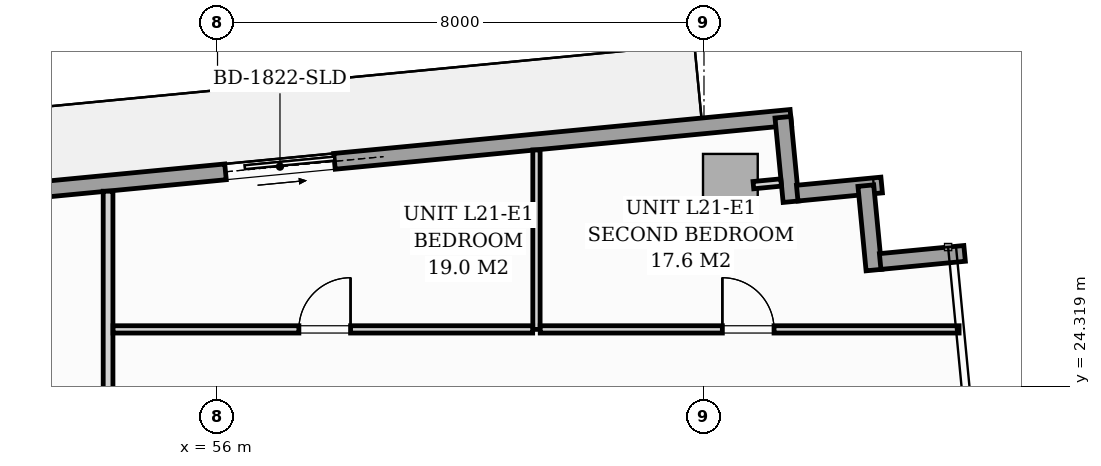
"""IFC4 building model, lengths in metres.
Left out: names, types, materials, properties, quantities, classifications, styles, units other than length and angle.
Written with IfcOpenShell. Run it as: python <this file> out.ifc"""

import sys

from ifc_helpers import new_model, si_unit, direction, frame, frame_2d, origin, origin_2d, place, context, subcontext, project, spatial, rectangle, extrude, source, transform, mapped, element, fill, save


model = new_model("IFC4")
c1 = context("Model", 3, precision=1e-05, world=origin(), true_north=direction((0.0, 1.0)))
c2 = subcontext(c1, "Body", "Model", "MODEL_VIEW")
j1 = project(units=[si_unit("LENGTHUNIT", "METRE"), si_unit("PLANEANGLEUNIT", "RADIAN")], contexts=[c1])
p1 = place(None, origin())
s1 = spatial("IfcSite", under=j1, at=p1, CompositionType="ELEMENT")
p2 = place(p1, origin())
s2 = spatial("IfcBuilding", under=s1, at=p2, CompositionType="ELEMENT")
p3 = place(p2, frame((0.0, 0.0, 77.8)))
s3 = spatial("IfcBuildingStorey", under=s2, at=p3, CompositionType="ELEMENT", Elevation=77.8)
m1 = source(origin(), c2, "Body", "SweptSolid", [
    extrude(rectangle(XDim=0.9, YDim=1.1, at=origin_2d()), origin(), (0.0, 0.0, 1.0), 3.194),
])
p4 = place(p3, frame((64.434, 27.591, 0.004), z_axis=(0.0, 0.0, 1.0), x_axis=(0.995396198367, 0.09584575252, 0.0)))
e1 = element("IfcColumn", 1, at=p4, inside=s3, PredefinedType="COLUMN", context=c2, shape_type="MappedRepresentation", body=[
    mapped(m1, transform((0.0, 0.0, 0.0), scale=1.0)),
])
p5 = place(p3, frame((46.406, 26.91, 0.0), z_axis=(0.0, 0.0, 1.0), x_axis=(0.995396638587, 0.095841180552, 0.0)))
e2 = element("IfcWall", 2, at=p5, inside=s3, PredefinedType="STANDARD", context=c2, shape_type="SweptSolid", body=[
    extrude(rectangle(XDim=19.11, YDim=0.26, at=frame_2d((9.555, 0.0))), origin(), (0.0, 0.0, 1.0), 2.94),
])
p6 = place(p5, frame((9.77, 0.0, 0.0)))
e3 = element("IfcOpeningElement", 3, at=p6, cuts=e2, PredefinedType="OPENING", context=c2, shape_type="SweptSolid", body=[
    extrude(rectangle(XDim=1.8, YDim=2.06, at=frame_2d((0.9, 1.03))), frame((0.0, 0.14, 0.0), z_axis=(0.0, -1.0, 0.0), x_axis=(1.0, 0.0, 0.0)), (0.0, 0.0, 1.0), 0.28),
])
for number, where, z_axis, x_axis in (
    (4, (65.298, 28.744, 0.0), (0.0, 0.0, 1.0), (0.096, -0.995, 0.0)),
    (5, (65.533, 27.496, 0.0), (0.0, 0.0, 1.0), (0.995, 0.096, 0.0)),
):
    element("IfcWall", number, at=place(p3, frame(where, z_axis=z_axis, x_axis=x_axis)), inside=s3, PredefinedType="STANDARD", context=c2, shape_type="SweptSolid", body=[
        extrude(rectangle(XDim=1.395, YDim=0.26, at=frame_2d((0.698, 0.0))), origin(), (0.0, 0.0, 1.0), 2.94),
    ])
p7 = place(p3, frame((66.662, 27.619, 0.0), z_axis=(0.0, 0.0, 1.0), x_axis=(0.095742423056, -0.99540614245, 0.0)))
e6 = element("IfcWall", 6, at=p7, inside=s3, PredefinedType="STANDARD", context=c2, shape_type="SweptSolid", body=[
    extrude(rectangle(XDim=1.395, YDim=0.26, at=frame_2d((0.697, 0.0))), origin(), (0.0, 0.0, 1.0), 2.94),
])
p8 = place(p3, frame((66.897, 26.371, 0.0), z_axis=(0.0, 0.0, 1.0), x_axis=(0.995391056452, 0.09589913835, 0.0)))
e7 = element("IfcWall", 7, at=p8, inside=s3, PredefinedType="STANDARD", context=c2, shape_type="SweptSolid", body=[
    extrude(rectangle(XDim=1.395, YDim=0.26, at=frame_2d((0.698, 0.0))), origin(), (0.0, 0.0, 1.0), 2.94),
])
p9 = place(p3, frame((54.2, 12.432, 0.0), z_axis=(0.0, 0.0, 1.0), x_axis=(0.0, 1.0, 0.0)))
e8 = element("IfcWall", 8, at=p9, inside=s3, PredefinedType="PARTITIONING", context=c2, shape_type="SweptSolid", body=[
    extrude(rectangle(XDim=15.095, YDim=0.16, at=frame_2d((7.548, 0.0))), origin(), (0.0, 0.0, 1.0), 2.94),
])
p10 = place(p9, frame((0.429, 0.0, 0.0)))
e9 = element("IfcOpeningElement", 9, at=p10, cuts=e8, PredefinedType="OPENING", context=c2, shape_type="SweptSolid", body=[
    extrude(rectangle(XDim=0.95, YDim=2.06, at=frame_2d((0.475, 1.03))), frame((0.0, 0.09, 0.0), z_axis=(0.0, -1.0, 0.0), x_axis=(1.0, 0.0, 0.0)), (0.0, 0.0, 1.0), 0.18),
])
p11 = place(p3, frame((61.245, 25.255, 0.0), z_axis=(0.0, 0.0, 1.0), x_axis=(0.0, 1.0, 0.0)))
e10 = element("IfcWall", 10, at=p11, inside=s3, PredefinedType="PARTITIONING", context=c2, shape_type="SweptSolid", body=[
    extrude(rectangle(XDim=2.951, YDim=0.12, at=frame_2d((1.476, 0.0))), origin(), (0.0, 0.0, 1.0), 2.94),
])
p12 = place(p3, frame((54.282, 25.255, 0.0), z_axis=(0.0, 0.0, 1.0), x_axis=(1.0, 0.0, 0.0)))
e11 = element("IfcWall", 11, at=p12, inside=s3, PredefinedType="PARTITIONING", context=c2, shape_type="SweptSolid", body=[
    extrude(rectangle(XDim=6.901, YDim=0.12, at=frame_2d((3.451, 0.0))), origin(), (0.0, 0.0, 1.0), 2.94),
])
p13 = place(p12, frame((3.056, 0.0, 0.0)))
e12 = element("IfcOpeningElement", 12, at=p13, cuts=e11, PredefinedType="OPENING", context=c2, shape_type="SweptSolid", body=[
    extrude(rectangle(XDim=0.85, YDim=2.05, at=frame_2d((0.425, 1.025))), frame((0.0, 0.07, 0.0), z_axis=(0.0, -1.0, 0.0), x_axis=(1.0, 0.0, 0.0)), (0.0, 0.0, 1.0), 0.14),
])
p14 = place(p3, frame((61.307, 25.255, 0.0), z_axis=(0.0, 0.0, 1.0), x_axis=(1.0, 0.0, 0.0)))
e13 = element("IfcWall", 13, at=p14, inside=s3, PredefinedType="PARTITIONING", context=c2, shape_type="SweptSolid", body=[
    extrude(rectangle(XDim=6.888, YDim=0.12, at=frame_2d((3.444, 0.0))), origin(), (0.0, 0.0, 1.0), 2.94),
])
p15 = place(p14, frame((2.995, 0.0, 0.0)))
e14 = element("IfcOpeningElement", 14, at=p15, cuts=e13, PredefinedType="OPENING", context=c2, shape_type="SweptSolid", body=[
    extrude(rectangle(XDim=0.85, YDim=2.05, at=frame_2d((0.425, 1.025))), frame((0.0, 0.07, 0.0), z_axis=(0.0, -1.0, 0.0), x_axis=(1.0, 0.0, 0.0)), (0.0, 0.0, 1.0), 0.14),
])
p16 = place(p3, frame((64.812, 27.627, 0.0), z_axis=(0.0, 0.0, 1.0), x_axis=(0.995389482415, 0.095915474751, 0.0)))
e15 = element("IfcWall", 15, at=p16, inside=s3, PredefinedType="PARTITIONING", context=c2, shape_type="SweptSolid", body=[
    extrude(rectangle(XDim=0.458, YDim=0.12, at=frame_2d((0.229, 0.0))), origin(), (0.0, 0.0, 1.0), 2.94),
])
m2 = source(origin(), c2, "Body", "SweptSolid", [
    extrude(rectangle(XDim=1.8, YDim=2.06, at=frame_2d((0.9, 1.03))), frame((0.0, 0.025, 0.0), z_axis=(0.0, -1.0, 0.0), x_axis=(1.0, 0.0, 0.0)), (0.0, 0.0, 1.0), 0.05),
])
p17 = place(p6, origin())
e16 = element("IfcDoor", 16, at=p17, inside=s3, OperationType="SLIDING_TO_RIGHT", PredefinedType="DOOR", context=c2, shape_type="MappedRepresentation", body=[
    mapped(m2, transform((0.0, 0.0, 0.0), scale=1.0)),
])
fill(e3, e16)
m3 = source(origin(), c2, "Body", "SweptSolid", [
    extrude(rectangle(XDim=0.85, YDim=2.05, at=frame_2d((0.425, 1.025))), frame((0.0, 0.025, 0.0), z_axis=(0.0, -1.0, 0.0), x_axis=(1.0, 0.0, 0.0)), (0.0, 0.0, 1.0), 0.05),
])
p18 = place(p13, origin())
e17 = element("IfcDoor", 17, at=p18, inside=s3, OperationType="SINGLE_SWING_RIGHT", PredefinedType="DOOR", context=c2, shape_type="MappedRepresentation", body=[
    mapped(m3, transform((0.0, 0.0, 0.0), scale=1.0)),
])
fill(e12, e17)
p19 = place(p15, origin())
e18 = element("IfcDoor", 18, at=p19, inside=s3, OperationType="SINGLE_SWING_LEFT", PredefinedType="DOOR", context=c2, shape_type="MappedRepresentation", body=[
    mapped(m3, transform((0.0, 0.0, 0.0), scale=1.0)),
])
fill(e14, e18)
save(model, sys.argv[1])
